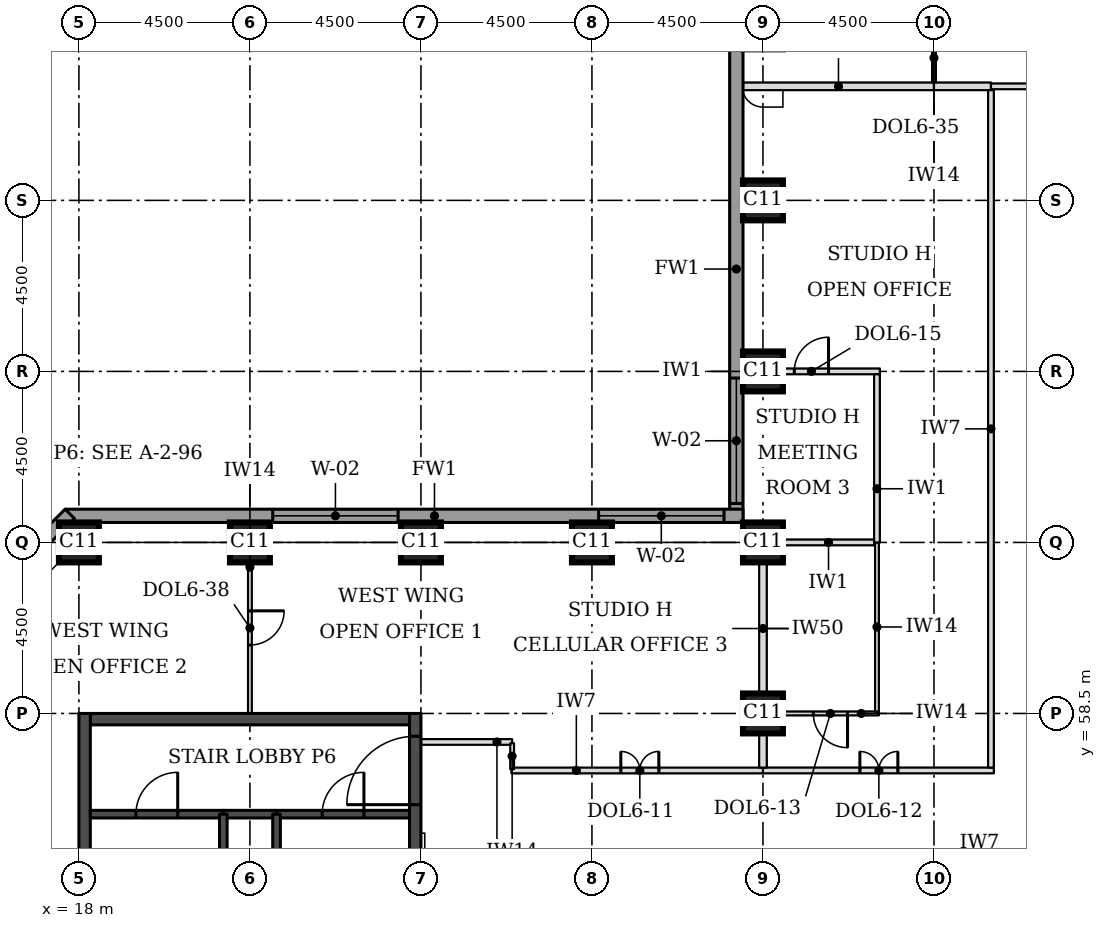
"""IFC4 building model, lengths in metres.
Left out: names, types, materials, properties, quantities, classifications, styles, units other than length and angle.
Written with IfcOpenShell. Run it as: python <this file> out.ifc"""

import sys

from ifc_helpers import new_model, si_unit, direction, frame, frame_2d, origin, origin_2d, place, context, subcontext, project, spatial, rectangle, extrude, element, fill, save


model = new_model("IFC4")
c1 = context("Model", 3, precision=1e-05, world=origin(), true_north=direction((0.0, 1.0)))
c2 = subcontext(c1, "Body", "Model", "MODEL_VIEW")
j1 = project(units=[si_unit("LENGTHUNIT", "METRE"), si_unit("PLANEANGLEUNIT", "RADIAN")], contexts=[c1])
p1 = place(None, origin())
s1 = spatial("IfcSite", under=j1, at=p1, CompositionType="ELEMENT")
p2 = place(p1, origin())
s2 = spatial("IfcBuilding", under=s1, at=p2, CompositionType="ELEMENT")
p3 = place(p2, frame((0.0, 0.0, 115.9)))
s3 = spatial("IfcBuildingStorey", under=s2, at=p3, CompositionType="ELEMENT", Elevation=115.9)
for number, where, z_axis, x_axis in (
    (1, (36.0, 58.5, 0.0), (0.0, 0.0, 1.0), (1.0, 0.0, 0.0)),
    (2, (18.0, 63.0, 0.0), (0.0, 0.0, 1.0), (1.0, 0.0, 0.0)),
    (3, (22.5, 63.0, 0.0), (0.0, 0.0, 1.0), (1.0, 0.0, 0.0)),
    (4, (27.0, 63.0, 0.0), (0.0, 0.0, 1.0), (1.0, 0.0, 0.0)),
    (5, (31.5, 63.0, 0.0), (0.0, 0.0, 1.0), (1.0, 0.0, 0.0)),
    (6, (36.0, 63.0, 0.0), (0.0, 0.0, 1.0), (1.0, 0.0, 0.0)),
    (7, (36.0, 67.5, 0.0), (0.0, 0.0, 1.0), (1.0, 0.0, 0.0)),
    (8, (36.0, 72.0, 0.0), (0.0, 0.0, 1.0), (1.0, 0.0, 0.0)),
):
    element("IfcColumn", number, at=place(p3, frame(where, z_axis=z_axis, x_axis=x_axis)), inside=s3, PredefinedType="COLUMN", context=c2, shape_type="SweptSolid", body=[
        extrude(rectangle(XDim=1.05, YDim=1.05, at=origin_2d()), origin(), (0.0, 0.0, 1.0), 3.7),
    ])
p4 = place(p3, frame((18.3, 58.35, 0.0), z_axis=(0.0, 0.0, 1.0), x_axis=(1.0, 0.0, 0.0)))
e9 = element("IfcWall", 9, at=p4, inside=s3, PredefinedType="SHEAR", context=c2, shape_type="SweptSolid", body=[
    extrude(rectangle(XDim=8.4, YDim=0.3, at=frame_2d((4.2, 0.0))), origin(), (0.0, 0.0, 1.0), 3.7),
])
p5 = place(p3, frame((18.15, 49.5, 0.0), z_axis=(0.0, 0.0, 1.0), x_axis=(0.0, 1.0, 0.0)))
e10 = element("IfcWall", 10, at=p5, inside=s3, PredefinedType="SHEAR", context=c2, shape_type="SweptSolid", body=[
    extrude(rectangle(XDim=9.0, YDim=0.3, at=frame_2d((4.5, 0.0))), origin(), (0.0, 0.0, 1.0), 3.7),
])
p6 = place(p3, frame((26.85, 49.5, 0.0), z_axis=(0.0, 0.0, 1.0), x_axis=(0.0, 1.0, 0.0)))
e11 = element("IfcWall", 11, at=p6, inside=s3, PredefinedType="SHEAR", context=c2, shape_type="SweptSolid", body=[
    extrude(rectangle(XDim=9.0, YDim=0.3, at=frame_2d((4.5, 0.0))), origin(), (0.0, 0.0, 1.0), 3.7),
])
p7 = place(p6, frame((6.6, 0.0, 0.0)))
e12 = element("IfcOpeningElement", 12, at=p7, cuts=e11, PredefinedType="OPENING", context=c2, shape_type="SweptSolid", body=[
    extrude(rectangle(XDim=1.8, YDim=2.1, at=frame_2d((0.9, 1.05))), frame((0.0, 0.16, 0.0), z_axis=(0.0, -1.0, 0.0), x_axis=(1.0, 0.0, 0.0)), (0.0, 0.0, 1.0), 0.32),
])
p8 = place(p3, frame((35.3, 76.862, 0.0), z_axis=(0.0, 0.0, 1.0), x_axis=(0.0, -1.0, 0.0)))
e13 = element("IfcWall", 13, at=p8, inside=s3, PredefinedType="STANDARD", context=c2, shape_type="SweptSolid", body=[
    extrude(rectangle(XDim=13.337, YDim=0.35, at=frame_2d((6.669, 0.0))), origin(), (0.0, 0.0, 1.0), 3.525),
])
p9 = place(p8, frame((9.537, 0.0, 0.9)))
e14 = element("IfcOpeningElement", 14, at=p9, cuts=e13, PredefinedType="OPENING", context=c2, shape_type="SweptSolid", body=[
    extrude(rectangle(XDim=3.3, YDim=1.9, at=frame_2d((1.65, 0.95))), frame((0.0, 0.185, 0.0), z_axis=(0.0, -1.0, 0.0), x_axis=(1.0, 0.0, 0.0)), (0.0, 0.0, 1.0), 0.37),
])
p10 = place(p3, frame((35.475, 63.7, 0.0), z_axis=(0.0, 0.0, 1.0), x_axis=(-1.0, 0.0, 0.0)))
e15 = element("IfcWall", 15, at=p10, inside=s3, PredefinedType="STANDARD", context=c2, shape_type="SweptSolid", body=[
    extrude(rectangle(XDim=17.837, YDim=0.35, at=frame_2d((8.919, 0.0))), origin(), (0.0, 0.0, 1.0), 3.525),
])
p11 = place(p10, frame((0.5, 0.0, 0.9)))
e16 = element("IfcOpeningElement", 16, at=p11, cuts=e15, PredefinedType="OPENING", context=c2, shape_type="SweptSolid", body=[
    extrude(rectangle(XDim=3.3, YDim=1.9, at=frame_2d((1.65, 0.95))), frame((0.0, 0.185, 0.0), z_axis=(0.0, -1.0, 0.0), x_axis=(1.0, 0.0, 0.0)), (0.0, 0.0, 1.0), 0.37),
])
p12 = place(p10, frame((9.075, 0.0, 0.9)))
e17 = element("IfcOpeningElement", 17, at=p12, cuts=e15, PredefinedType="OPENING", context=c2, shape_type="SweptSolid", body=[
    extrude(rectangle(XDim=3.3, YDim=1.9, at=frame_2d((1.65, 0.95))), frame((0.0, 0.185, 0.0), z_axis=(0.0, -1.0, 0.0), x_axis=(1.0, 0.0, 0.0)), (0.0, 0.0, 1.0), 0.37),
])
p13 = place(p3, frame((17.761, 63.751, 0.0), z_axis=(0.0, 0.0, 1.0), x_axis=(-0.707106781187, -0.707106781187, 0.0)))
e18 = element("IfcWall", 18, at=p13, inside=s3, PredefinedType="STANDARD", context=c2, shape_type="SweptSolid", body=[
    extrude(rectangle(XDim=7.089, YDim=0.35, at=frame_2d((3.544, 0.0))), origin(), (0.0, 0.0, 1.0), 3.525),
])
p14 = place(p13, frame((1.894, 0.0, 0.9)))
e19 = element("IfcOpeningElement", 19, at=p14, cuts=e18, PredefinedType="OPENING", context=c2, shape_type="SweptSolid", body=[
    extrude(rectangle(XDim=3.3, YDim=1.9, at=frame_2d((1.65, 0.95))), frame((0.0, 0.185, 0.0), z_axis=(0.0, -1.0, 0.0), x_axis=(1.0, 0.0, 0.0)), (0.0, 0.0, 1.0), 0.37),
])
p15 = place(p3, frame((29.38, 57.0, 0.0), z_axis=(0.0, 0.0, 1.0), x_axis=(1.0, 0.0, 0.0)))
e20 = element("IfcWall", 20, at=p15, inside=s3, PredefinedType="PARTITIONING", context=c2, shape_type="SweptSolid", body=[
    extrude(rectangle(XDim=6.62, YDim=0.15, at=frame_2d((3.31, 0.0))), origin(), (0.0, 0.0, 1.0), 3.55),
])
p16 = place(p15, frame((2.88, 0.0, 0.0)))
e21 = element("IfcOpeningElement", 21, at=p16, cuts=e20, PredefinedType="OPENING", context=c2, shape_type="SweptSolid", body=[
    extrude(rectangle(XDim=1.0, YDim=2.1, at=frame_2d((0.5, 1.05))), frame((0.0, 0.085, 0.0), z_axis=(0.0, -1.0, 0.0), x_axis=(1.0, 0.0, 0.0)), (0.0, 0.0, 1.0), 0.17),
])
p17 = place(p3, frame((36.0, 57.0, 0.0), z_axis=(0.0, 0.0, 1.0), x_axis=(1.0, 0.0, 0.0)))
e22 = element("IfcWall", 22, at=p17, inside=s3, PredefinedType="PARTITIONING", context=c2, shape_type="SweptSolid", body=[
    extrude(rectangle(XDim=6.075, YDim=0.15, at=frame_2d((3.038, 0.0))), origin(), (0.0, 0.0, 1.0), 3.55),
])
p18 = place(p17, frame((2.55, 0.0, 0.0)))
e23 = element("IfcOpeningElement", 23, at=p18, cuts=e22, PredefinedType="OPENING", context=c2, shape_type="SweptSolid", body=[
    extrude(rectangle(XDim=1.0, YDim=2.1, at=frame_2d((0.5, 1.05))), frame((0.0, 0.085, 0.0), z_axis=(0.0, -1.0, 0.0), x_axis=(1.0, 0.0, 0.0)), (0.0, 0.0, 1.0), 0.17),
])
p19 = place(p3, frame((36.525, 58.5, 0.0), z_axis=(0.0, 0.0, 1.0), x_axis=(1.0, 0.0, 0.0)))
e24 = element("IfcWall", 24, at=p19, inside=s3, PredefinedType="PARTITIONING", context=c2, shape_type="SweptSolid", body=[
    extrude(rectangle(XDim=2.525, YDim=0.1, at=frame_2d((1.263, 0.0))), origin(), (0.0, 0.0, 1.0), 3.55),
])
p20 = place(p19, frame((0.8, 0.0, 0.0)))
e25 = element("IfcOpeningElement", 25, at=p20, cuts=e24, PredefinedType="OPENING", context=c2, shape_type="SweptSolid", body=[
    extrude(rectangle(XDim=0.9, YDim=2.1, at=frame_2d((0.45, 1.05))), frame((0.0, 0.06, 0.0), z_axis=(0.0, -1.0, 0.0), x_axis=(1.0, 0.0, 0.0)), (0.0, 0.0, 1.0), 0.12),
])
p21 = place(p3, frame((36.525, 63.0, 0.0), z_axis=(0.0, 0.0, 1.0), x_axis=(1.0, 0.0, 0.0)))
e26 = element("IfcWall", 26, at=p21, inside=s3, PredefinedType="PARTITIONING", context=c2, shape_type="SweptSolid", body=[
    extrude(rectangle(XDim=2.4, YDim=0.15, at=frame_2d((1.2, 0.0))), origin(), (0.0, 0.0, 1.0), 3.55),
])
p22 = place(p3, frame((35.475, 67.5, 0.0), z_axis=(0.0, 0.0, 1.0), x_axis=(1.0, 0.0, 0.0)))
e27 = element("IfcWall", 27, at=p22, inside=s3, PredefinedType="PARTITIONING", context=c2, shape_type="SweptSolid", body=[
    extrude(rectangle(XDim=3.6, YDim=0.15, at=frame_2d((1.8, 0.0))), origin(), (0.0, 0.0, 1.0), 3.55),
])
p23 = place(p22, frame((1.35, 0.0, 0.0)))
e28 = element("IfcOpeningElement", 28, at=p23, cuts=e27, PredefinedType="OPENING", context=c2, shape_type="SweptSolid", body=[
    extrude(rectangle(XDim=0.9, YDim=2.1, at=frame_2d((0.45, 1.05))), frame((0.0, 0.085, 0.0), z_axis=(0.0, -1.0, 0.0), x_axis=(1.0, 0.0, 0.0)), (0.0, 0.0, 1.0), 0.17),
])
p24 = place(p3, frame((35.475, 75.0, 0.0), z_axis=(0.0, 0.0, 1.0), x_axis=(1.0, 0.0, 0.0)))
e29 = element("IfcWall", 29, at=p24, inside=s3, PredefinedType="PARTITIONING", context=c2, shape_type="SweptSolid", body=[
    extrude(rectangle(XDim=5.025, YDim=0.2, at=frame_2d((2.512, 0.0))), origin(), (0.0, 0.0, 1.0), 3.55),
])
p25 = place(p3, frame((40.5, 75.0, 0.0), z_axis=(0.0, 0.0, 1.0), x_axis=(1.0, 0.0, 0.0)))
e30 = element("IfcWall", 30, at=p25, inside=s3, PredefinedType="PARTITIONING", context=c2, shape_type="SweptSolid", body=[
    extrude(rectangle(XDim=1.5, YDim=0.2, at=frame_2d((0.75, 0.0))), origin(), (0.0, 0.0, 1.0), 3.55),
])
p26 = place(p3, frame((42.0, 75.0, 0.0), z_axis=(0.0, 0.0, 1.0), x_axis=(1.0, 0.0, 0.0)))
e31 = element("IfcWall", 31, at=p26, inside=s3, PredefinedType="PARTITIONING", context=c2, shape_type="SweptSolid", body=[
    extrude(rectangle(XDim=4.5, YDim=0.15, at=frame_2d((2.25, 0.0))), origin(), (0.0, 0.0, 1.0), 3.55),
])
p27 = place(p26, frame((1.75, 0.0, 0.0)))
e32 = element("IfcOpeningElement", 32, at=p27, cuts=e31, PredefinedType="OPENING", context=c2, shape_type="SweptSolid", body=[
    extrude(rectangle(XDim=1.0, YDim=2.1, at=frame_2d((0.5, 1.05))), frame((0.0, 0.085, 0.0), z_axis=(0.0, -1.0, 0.0), x_axis=(1.0, 0.0, 0.0)), (0.0, 0.0, 1.0), 0.17),
])
p28 = place(p3, frame((36.0, 57.075, 0.0), z_axis=(0.0, 0.0, 1.0), x_axis=(0.0, 1.0, 0.0)))
e33 = element("IfcWall", 33, at=p28, inside=s3, PredefinedType="PARTITIONING", context=c2, shape_type="SweptSolid", body=[
    extrude(rectangle(XDim=0.9, YDim=0.2, at=frame_2d((0.45, 0.0))), origin(), (0.0, 0.0, 1.0), 2.8),
])
p29 = place(p3, frame((42.0, 57.075, 0.0), z_axis=(0.0, 0.0, 1.0), x_axis=(0.0, 1.0, 0.0)))
e34 = element("IfcWall", 34, at=p29, inside=s3, PredefinedType="PARTITIONING", context=c2, shape_type="SweptSolid", body=[
    extrude(rectangle(XDim=17.825, YDim=0.15, at=frame_2d((8.913, 0.0))), origin(), (0.0, 0.0, 1.0), 3.55),
])
p30 = place(p3, frame((39.0, 58.55, 0.0), z_axis=(0.0, 0.0, 1.0), x_axis=(0.0, 1.0, 0.0)))
e35 = element("IfcWall", 35, at=p30, inside=s3, PredefinedType="PARTITIONING", context=c2, shape_type="SweptSolid", body=[
    extrude(rectangle(XDim=4.45, YDim=0.1, at=frame_2d((2.225, 0.0))), origin(), (0.0, 0.0, 1.0), 3.55),
])
p31 = place(p3, frame((36.0, 58.995, 0.0), z_axis=(0.0, 0.0, 1.0), x_axis=(0.0, 1.0, 0.0)))
e36 = element("IfcWall", 36, at=p31, inside=s3, PredefinedType="PARTITIONING", context=c2, shape_type="SweptSolid", body=[
    extrude(rectangle(XDim=3.48, YDim=0.2, at=frame_2d((1.74, 0.0))), origin(), (0.0, 0.0, 1.0), 2.8),
])
p32 = place(p3, frame((39.0, 63.0, 0.0), z_axis=(0.0, 0.0, 1.0), x_axis=(0.0, 1.0, 0.0)))
e37 = element("IfcWall", 37, at=p32, inside=s3, PredefinedType="PARTITIONING", context=c2, shape_type="SweptSolid", body=[
    extrude(rectangle(XDim=4.425, YDim=0.15, at=frame_2d((2.212, 0.0))), origin(), (0.0, 0.0, 1.0), 3.55),
])
p33 = place(p3, frame((40.5, 75.1, 0.0), z_axis=(0.0, 0.0, 1.0), x_axis=(0.0, 1.0, 0.0)))
e38 = element("IfcWall", 38, at=p33, inside=s3, PredefinedType="PARTITIONING", context=c2, shape_type="SweptSolid", body=[
    extrude(rectangle(XDim=2.9, YDim=0.1, at=frame_2d((1.45, 0.0))), origin(), (0.0, 0.0, 1.0), 3.55),
])
p34 = place(p33, frame((1.0, 0.0, 0.0)))
e39 = element("IfcOpeningElement", 39, at=p34, cuts=e38, PredefinedType="OPENING", context=c2, shape_type="SweptSolid", body=[
    extrude(rectangle(XDim=0.9, YDim=2.1, at=frame_2d((0.45, 1.05))), frame((0.0, 0.06, 0.0), z_axis=(0.0, -1.0, 0.0), x_axis=(1.0, 0.0, 0.0)), (0.0, 0.0, 1.0), 0.12),
])
p35 = place(p3, frame((22.5, 63.0, 0.0), z_axis=(0.0, 0.0, 1.0), x_axis=(0.0, -1.0, 0.0)))
e40 = element("IfcWall", 40, at=p35, inside=s3, PredefinedType="PARTITIONING", context=c2, shape_type="SweptSolid", body=[
    extrude(rectangle(XDim=4.5, YDim=0.1, at=frame_2d((2.25, 0.0))), origin(), (0.0, 0.0, 1.0), 3.55),
])
p36 = place(p35, frame((1.8, 0.0, 0.0)))
e41 = element("IfcOpeningElement", 41, at=p36, cuts=e40, PredefinedType="OPENING", context=c2, shape_type="SweptSolid", body=[
    extrude(rectangle(XDim=0.9, YDim=2.1, at=frame_2d((0.45, 1.05))), frame((0.0, 0.06, 0.0), z_axis=(0.0, -1.0, 0.0), x_axis=(1.0, 0.0, 0.0)), (0.0, 0.0, 1.0), 0.12),
])
p37 = place(p3, frame((27.0, 57.75, 0.0), z_axis=(0.0, 0.0, 1.0), x_axis=(1.0, 0.0, 0.0)))
e42 = element("IfcWall", 42, at=p37, inside=s3, PredefinedType="PARTITIONING", context=c2, shape_type="SweptSolid", body=[
    extrude(rectangle(XDim=2.4, YDim=0.15, at=frame_2d((1.2, 0.0))), origin(), (0.0, 0.0, 1.0), 3.55),
])
p38 = place(p3, frame((29.4, 57.715, 0.0), z_axis=(0.0, 0.0, 1.0), x_axis=(0.0, -1.0, 0.0)))
e43 = element("IfcWall", 43, at=p38, inside=s3, PredefinedType="PARTITIONING", context=c2, shape_type="SweptSolid", body=[
    extrude(rectangle(XDim=0.68, YDim=0.1, at=frame_2d((0.34, 0.0))), origin(), (0.0, 0.0, 1.0), 3.55),
])
p39 = place(p3, frame((21.8, 55.85, 0.0), z_axis=(0.0, 0.0, 1.0), x_axis=(1.0, 0.0, 0.0)))
e44 = element("IfcWall", 44, at=p39, inside=s3, PredefinedType="SOLIDWALL", context=c2, shape_type="SweptSolid", body=[
    extrude(rectangle(XDim=1.4, YDim=0.2, at=frame_2d((0.7, 0.0))), origin(), (0.0, 0.0, 1.0), 3.55),
])
p40 = place(p3, frame((18.3, 55.85, 0.0), z_axis=(0.0, 0.0, 1.0), x_axis=(1.0, 0.0, 0.0)))
e45 = element("IfcWall", 45, at=p40, inside=s3, PredefinedType="SOLIDWALL", context=c2, shape_type="SweptSolid", body=[
    extrude(rectangle(XDim=3.5, YDim=0.2, at=frame_2d((1.75, 0.0))), origin(), (0.0, 0.0, 1.0), 3.55),
])
p41 = place(p40, frame((1.2, 0.0, 0.0)))
e46 = element("IfcOpeningElement", 46, at=p41, cuts=e45, PredefinedType="OPENING", context=c2, shape_type="SweptSolid", body=[
    extrude(rectangle(XDim=1.1, YDim=2.1, at=frame_2d((0.55, 1.05))), frame((0.0, 0.11, 0.0), z_axis=(0.0, -1.0, 0.0), x_axis=(1.0, 0.0, 0.0)), (0.0, 0.0, 1.0), 0.22),
])
p42 = place(p3, frame((23.2, 55.85, 0.0), z_axis=(0.0, 0.0, 1.0), x_axis=(1.0, 0.0, 0.0)))
e47 = element("IfcWall", 47, at=p42, inside=s3, PredefinedType="SOLIDWALL", context=c2, shape_type="SweptSolid", body=[
    extrude(rectangle(XDim=3.5, YDim=0.2, at=frame_2d((1.75, 0.0))), origin(), (0.0, 0.0, 1.0), 3.55),
])
p43 = place(p42, frame((1.2, 0.0, 0.0)))
e48 = element("IfcOpeningElement", 48, at=p43, cuts=e47, PredefinedType="OPENING", context=c2, shape_type="SweptSolid", body=[
    extrude(rectangle(XDim=1.1, YDim=2.1, at=frame_2d((0.55, 1.05))), frame((0.0, 0.11, 0.0), z_axis=(0.0, -1.0, 0.0), x_axis=(1.0, 0.0, 0.0)), (0.0, 0.0, 1.0), 0.22),
])
for number, where, z_axis, x_axis in (
    (49, (21.8, 49.8, 0.0), (0.0, 0.0, 1.0), (0.0, 1.0, 0.0)),
    (50, (23.2, 49.8, 0.0), (0.0, 0.0, 1.0), (0.0, 1.0, 0.0)),
):
    element("IfcWall", number, at=place(p3, frame(where, z_axis=z_axis, x_axis=x_axis)), inside=s3, PredefinedType="SOLIDWALL", context=c2, shape_type="SweptSolid", body=[
        extrude(rectangle(XDim=6.05, YDim=0.2, at=frame_2d((3.025, 0.0))), origin(), (0.0, 0.0, 1.0), 3.55),
    ])
p44 = place(p9, origin())
e51 = element("IfcWindow", 51, at=p44, inside=s3, PartitioningType="SINGLE_PANEL", PredefinedType="WINDOW", context=c2, shape_type="SweptSolid", body=[
    extrude(rectangle(XDim=3.3, YDim=1.9, at=frame_2d((1.65, 0.95))), frame((0.0, 0.085, 0.0), z_axis=(0.0, -1.0, 0.0), x_axis=(1.0, 0.0, 0.0)), (0.0, 0.0, 1.0), 0.06),
])
fill(e14, e51)
p45 = place(p11, origin())
e52 = element("IfcWindow", 52, at=p45, inside=s3, PartitioningType="SINGLE_PANEL", PredefinedType="WINDOW", context=c2, shape_type="SweptSolid", body=[
    extrude(rectangle(XDim=3.3, YDim=1.9, at=frame_2d((1.65, 0.95))), frame((0.0, 0.085, 0.0), z_axis=(0.0, -1.0, 0.0), x_axis=(1.0, 0.0, 0.0)), (0.0, 0.0, 1.0), 0.06),
])
fill(e16, e52)
p46 = place(p12, origin())
e53 = element("IfcWindow", 53, at=p46, inside=s3, PartitioningType="SINGLE_PANEL", PredefinedType="WINDOW", context=c2, shape_type="SweptSolid", body=[
    extrude(rectangle(XDim=3.3, YDim=1.9, at=frame_2d((1.65, 0.95))), frame((0.0, 0.085, 0.0), z_axis=(0.0, -1.0, 0.0), x_axis=(1.0, 0.0, 0.0)), (0.0, 0.0, 1.0), 0.06),
])
fill(e17, e53)
p47 = place(p18, origin())
e54 = element("IfcDoor", 54, at=p47, inside=s3, OperationType="DOUBLE_DOOR_SINGLE_SWING", PredefinedType="DOOR", context=c2, shape_type="SweptSolid", body=[
    extrude(rectangle(XDim=1.0, YDim=2.1, at=frame_2d((0.5, 1.05))), frame((0.0, 0.025, 0.0), z_axis=(0.0, -1.0, 0.0), x_axis=(1.0, 0.0, 0.0)), (0.0, 0.0, 1.0), 0.05),
])
fill(e23, e54)
p48 = place(p20, frame((0.9, 0.0, 0.0), z_axis=(0.0, 0.0, 1.0), x_axis=(-1.0, 0.0, 0.0)))
e55 = element("IfcDoor", 55, at=p48, inside=s3, OperationType="SINGLE_SWING_LEFT", PredefinedType="DOOR", context=c2, shape_type="SweptSolid", body=[
    extrude(rectangle(XDim=0.9, YDim=2.1, at=frame_2d((0.45, 1.05))), frame((0.0, 0.025, 0.0), z_axis=(0.0, -1.0, 0.0), x_axis=(1.0, 0.0, 0.0)), (0.0, 0.0, 1.0), 0.05),
])
fill(e25, e55)
p49 = place(p23, origin())
e56 = element("IfcDoor", 56, at=p49, inside=s3, OperationType="SINGLE_SWING_RIGHT", PredefinedType="DOOR", context=c2, shape_type="SweptSolid", body=[
    extrude(rectangle(XDim=0.9, YDim=2.1, at=frame_2d((0.45, 1.05))), frame((0.0, 0.025, 0.0), z_axis=(0.0, -1.0, 0.0), x_axis=(1.0, 0.0, 0.0)), (0.0, 0.0, 1.0), 0.05),
])
fill(e28, e56)
p50 = place(p16, origin())
e57 = element("IfcDoor", 57, at=p50, inside=s3, OperationType="DOUBLE_DOOR_SINGLE_SWING", PredefinedType="DOOR", context=c2, shape_type="SweptSolid", body=[
    extrude(rectangle(XDim=1.0, YDim=2.1, at=frame_2d((0.5, 1.05))), frame((0.0, 0.025, 0.0), z_axis=(0.0, -1.0, 0.0), x_axis=(1.0, 0.0, 0.0)), (0.0, 0.0, 1.0), 0.05),
])
fill(e21, e57)
p51 = place(p36, origin())
e58 = element("IfcDoor", 58, at=p51, inside=s3, OperationType="SINGLE_SWING_LEFT", PredefinedType="DOOR", context=c2, shape_type="SweptSolid", body=[
    extrude(rectangle(XDim=0.9, YDim=2.1, at=frame_2d((0.45, 1.05))), frame((0.0, 0.025, 0.0), z_axis=(0.0, -1.0, 0.0), x_axis=(1.0, 0.0, 0.0)), (0.0, 0.0, 1.0), 0.05),
])
fill(e41, e58)
p52 = place(p41, origin())
e59 = element("IfcDoor", 59, at=p52, inside=s3, OperationType="SINGLE_SWING_RIGHT", PredefinedType="DOOR", context=c2, shape_type="SweptSolid", body=[
    extrude(rectangle(XDim=1.1, YDim=2.1, at=frame_2d((0.55, 1.05))), frame((0.0, 0.025, 0.0), z_axis=(0.0, -1.0, 0.0), x_axis=(1.0, 0.0, 0.0)), (0.0, 0.0, 1.0), 0.05),
])
fill(e46, e59)
p53 = place(p43, origin())
e60 = element("IfcDoor", 60, at=p53, inside=s3, OperationType="SINGLE_SWING_RIGHT", PredefinedType="DOOR", context=c2, shape_type="SweptSolid", body=[
    extrude(rectangle(XDim=1.1, YDim=2.1, at=frame_2d((0.55, 1.05))), frame((0.0, 0.025, 0.0), z_axis=(0.0, -1.0, 0.0), x_axis=(1.0, 0.0, 0.0)), (0.0, 0.0, 1.0), 0.05),
])
fill(e48, e60)
p54 = place(p7, origin())
e61 = element("IfcDoor", 61, at=p54, inside=s3, OperationType="SINGLE_SWING_LEFT", PredefinedType="DOOR", context=c2, shape_type="SweptSolid", body=[
    extrude(rectangle(XDim=1.8, YDim=2.1, at=frame_2d((0.9, 1.05))), frame((0.0, 0.025, 0.0), z_axis=(0.0, -1.0, 0.0), x_axis=(1.0, 0.0, 0.0)), (0.0, 0.0, 1.0), 0.05),
])
fill(e12, e61)
save(model, sys.argv[1])
